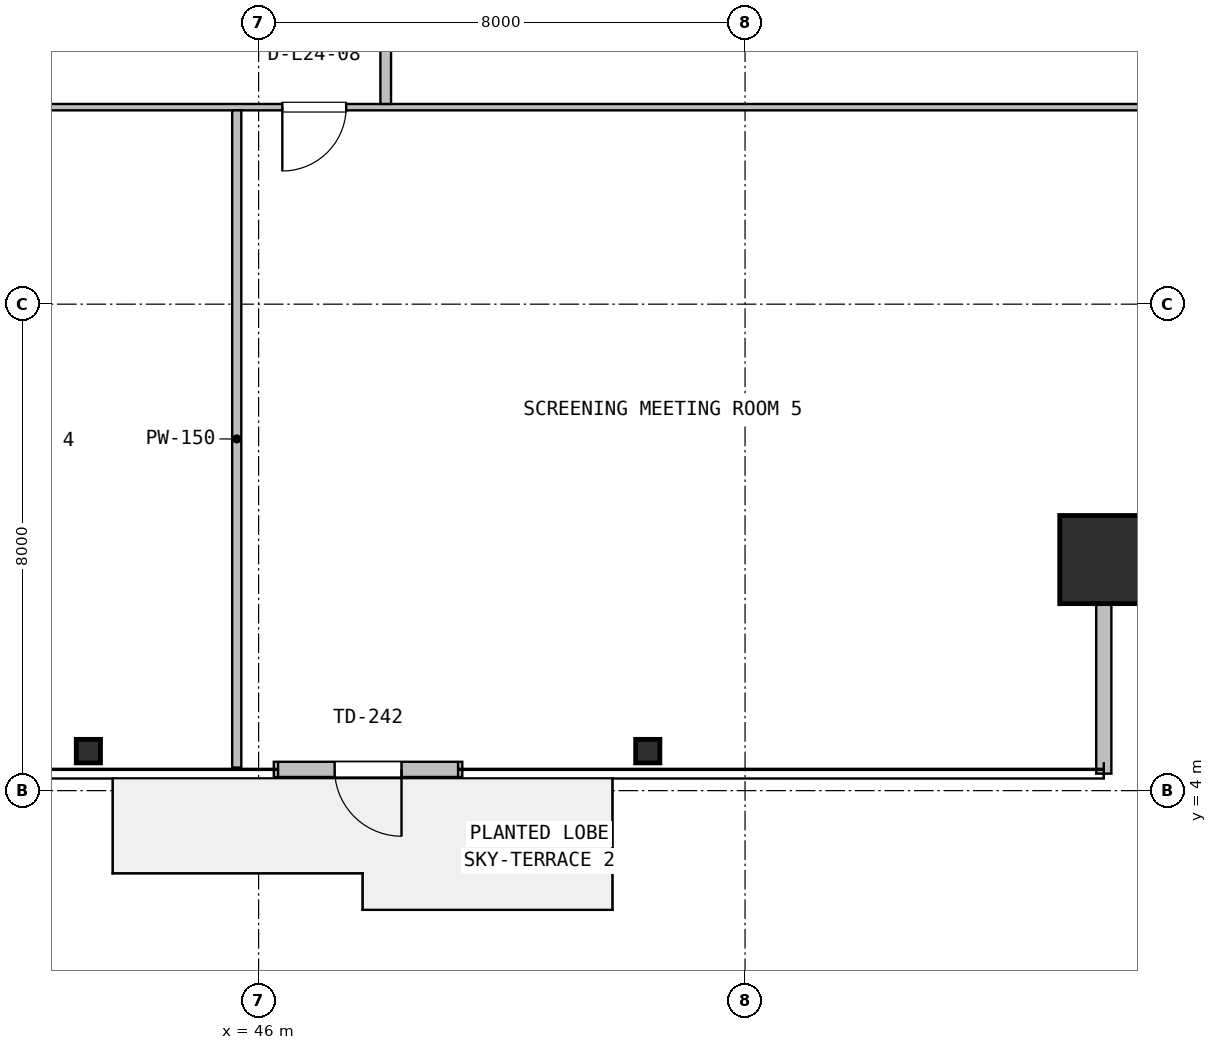
"""IFC4 building model, lengths in metres.
Left out: names, types, materials, properties, quantities, classifications, styles, units other than length and angle.
Written with IfcOpenShell. Run it as: python <this file> out.ifc"""

import sys

from ifc_helpers import new_model, si_unit, direction, frame, frame_2d, origin, origin_2d, place, context, subcontext, project, spatial, rectangle, hollow_rectangle, i_section, extrude, source, transform, mapped, element, fill, save


model = new_model("IFC4")
c1 = context("Model", 3, precision=1e-05, world=origin(), true_north=direction((0.0, 1.0)))
c2 = subcontext(c1, "Body", "Model", "MODEL_VIEW")
j1 = project(units=[si_unit("LENGTHUNIT", "METRE"), si_unit("PLANEANGLEUNIT", "RADIAN")], contexts=[c1])
p1 = place(None, origin())
s1 = spatial("IfcSite", under=j1, at=p1, CompositionType="ELEMENT")
p2 = place(p1, origin())
s2 = spatial("IfcBuilding", under=s1, at=p2, CompositionType="ELEMENT")
p3 = place(p2, frame((0.0, 0.0, 103.0)))
s3 = spatial("IfcBuildingStorey", under=s2, at=p3, CompositionType="ELEMENT", Elevation=103.0)
m1 = source(origin(), c2, "Body", "SweptSolid", [
    extrude(hollow_rectangle(XDim=1.45, YDim=1.45, WallThickness=0.055, at=origin_2d()), origin(), (0.0, 0.0, 1.0), 3.8),
])
p4 = place(p3, frame((59.9, 7.8, 0.0), z_axis=(0.0, 0.0, 1.0), x_axis=(1.0, 0.0, 0.0)))
e1 = element("IfcColumn", 1, at=p4, inside=s3, PredefinedType="COLUMN", context=c2, shape_type="MappedRepresentation", body=[
    mapped(m1, transform((0.0, 0.0, 0.0), x_axis=(1.0, 0.0, 0.0), y_axis=(0.0, 1.0, 0.0), z_axis=(0.0, 0.0, 1.0), scale=1.0)),
])
m2 = source(origin(), c2, "Body", "SweptSolid", [
    extrude(i_section(OverallWidth=0.398, OverallDepth=0.387, WebThickness=0.021, FlangeThickness=0.033, FilletRadius=0.018, at=origin_2d()), origin(), (0.0, 0.0, 1.0), 3.8),
])
for number, where, z_axis, x_axis in (
    (2, (43.2, 4.65, 0.0), (0.0, 0.0, 1.0), (1.0, 0.0, 0.0)),
    (3, (52.4, 4.65, 0.0), (0.0, 0.0, 1.0), (1.0, 0.0, 0.0)),
):
    element("IfcColumn", number, at=place(p3, frame(where, z_axis=z_axis, x_axis=x_axis)), inside=s3, PredefinedType="COLUMN", context=c2, shape_type="MappedRepresentation", body=[
        mapped(m2, transform((0.0, 0.0, 0.0), x_axis=(1.0, 0.0, 0.0), y_axis=(0.0, 1.0, 0.0), z_axis=(0.0, 0.0, 1.0), scale=1.0)),
    ])
p5 = place(p3, frame((46.25, 4.35, 0.0), z_axis=(0.0, 0.0, 1.0), x_axis=(1.0, 0.0, 0.0)))
e4 = element("IfcWall", 4, at=p5, inside=s3, PredefinedType="SOLIDWALL", context=c2, shape_type="SweptSolid", body=[
    extrude(rectangle(XDim=3.1, YDim=0.25, at=frame_2d((1.55, 0.0))), origin(), (0.0, 0.0, 1.0), 3.53),
])
p6 = place(p5, frame((1.0, 0.0, 0.0)))
e5 = element("IfcOpeningElement", 5, at=p6, cuts=e4, PredefinedType="OPENING", context=c2, shape_type="SweptSolid", body=[
    extrude(rectangle(XDim=1.1, YDim=2.15, at=frame_2d((0.55, 1.075))), frame((0.0, 0.135, 0.0), z_axis=(0.0, -1.0, 0.0), x_axis=(1.0, 0.0, 0.0)), (0.0, 0.0, 1.0), 0.27),
])
p7 = place(p3, frame((59.9, 4.28, 0.0), z_axis=(0.0, 0.0, 1.0), x_axis=(0.0, 1.0, 0.0)))
e6 = element("IfcWall", 6, at=p7, inside=s3, PredefinedType="SOLIDWALL", context=c2, shape_type="SweptSolid", body=[
    extrude(rectangle(XDim=3.6, YDim=0.25, at=frame_2d((1.8, 0.0))), origin(), (0.0, 0.0, 1.0), 3.108),
])
p8 = place(p3, frame((4.68, 15.24, 0.0), z_axis=(0.0, 0.0, 1.0), x_axis=(1.0, 0.0, 0.0)))
e7 = element("IfcWall", 7, at=p8, inside=s3, PredefinedType="PARTITIONING", context=c2, shape_type="SweptSolid", body=[
    extrude(rectangle(XDim=58.64, YDim=0.105, at=frame_2d((29.32, 0.0))), origin(), (0.0, 0.0, 1.0), 2.83),
])
p9 = place(p8, frame((17.105, 0.0, 0.0)))
e8 = element("IfcOpeningElement", 8, at=p9, cuts=e7, PredefinedType="OPENING", context=c2, shape_type="SweptSolid", body=[
    extrude(rectangle(XDim=0.88, YDim=2.06, at=frame_2d((0.44, 1.03))), frame((0.0, 0.062, 0.0), z_axis=(0.0, -1.0, 0.0), x_axis=(1.0, 0.0, 0.0)), (0.0, 0.0, 1.0), 0.125),
])
p10 = place(p8, frame((21.005, 0.0, 0.0)))
e9 = element("IfcOpeningElement", 9, at=p10, cuts=e7, PredefinedType="OPENING", context=c2, shape_type="SweptSolid", body=[
    extrude(rectangle(XDim=0.88, YDim=2.06, at=frame_2d((0.44, 1.03))), frame((0.0, 0.062, 0.0), z_axis=(0.0, -1.0, 0.0), x_axis=(1.0, 0.0, 0.0)), (0.0, 0.0, 1.0), 0.125),
])
p11 = place(p8, frame((27.42, 0.0, 0.0)))
e10 = element("IfcOpeningElement", 10, at=p11, cuts=e7, PredefinedType="OPENING", context=c2, shape_type="SweptSolid", body=[
    extrude(rectangle(XDim=0.88, YDim=2.06, at=frame_2d((0.44, 1.03))), frame((0.0, 0.062, 0.0), z_axis=(0.0, -1.0, 0.0), x_axis=(1.0, 0.0, 0.0)), (0.0, 0.0, 1.0), 0.125),
])
p12 = place(p8, frame((35.845, 0.0, 0.0)))
e11 = element("IfcOpeningElement", 11, at=p12, cuts=e7, PredefinedType="OPENING", context=c2, shape_type="SweptSolid", body=[
    extrude(rectangle(XDim=0.92, YDim=2.08, at=frame_2d((0.46, 1.04))), frame((0.0, 0.062, 0.0), z_axis=(0.0, -1.0, 0.0), x_axis=(1.0, 0.0, 0.0)), (0.0, 0.0, 1.0), 0.125),
])
p13 = place(p8, frame((41.71, 0.0, 0.0)))
e12 = element("IfcOpeningElement", 12, at=p13, cuts=e7, PredefinedType="OPENING", context=c2, shape_type="SweptSolid", body=[
    extrude(rectangle(XDim=1.05, YDim=2.1, at=frame_2d((0.525, 1.05))), frame((0.0, 0.062, 0.0), z_axis=(0.0, -1.0, 0.0), x_axis=(1.0, 0.0, 0.0)), (0.0, 0.0, 1.0), 0.125),
])
p14 = place(p3, frame((45.64, 4.38, 0.0), z_axis=(0.0, 0.0, 1.0), x_axis=(0.0, 1.0, 0.0)))
e13 = element("IfcWall", 13, at=p14, inside=s3, PredefinedType="PARTITIONING", context=c2, shape_type="SweptSolid", body=[
    extrude(rectangle(XDim=10.808, YDim=0.15, at=frame_2d((5.404, 0.0))), origin(), (0.0, 0.0, 1.0), 3.108),
])
p15 = place(p3, frame((48.09, 15.293, 0.0), z_axis=(0.0, 0.0, 1.0), x_axis=(0.0, 1.0, 0.0)))
e14 = element("IfcWall", 14, at=p15, inside=s3, PredefinedType="PARTITIONING", context=c2, shape_type="SweptSolid", body=[
    extrude(rectangle(XDim=17.982, YDim=0.175, at=frame_2d((8.991, 0.0))), origin(), (0.0, 0.0, 1.0), 3.222),
])
p16 = place(p15, frame((1.572, 0.0, 0.0)))
e15 = element("IfcOpeningElement", 15, at=p16, cuts=e14, PredefinedType="OPENING", context=c2, shape_type="SweptSolid", body=[
    extrude(rectangle(XDim=1.05, YDim=2.1, at=frame_2d((0.525, 1.05))), frame((0.0, 0.098, 0.0), z_axis=(0.0, -1.0, 0.0), x_axis=(1.0, 0.0, 0.0)), (0.0, 0.0, 1.0), 0.195),
])
p17 = place(p15, frame((6.732, 0.0, 0.0)))
e16 = element("IfcOpeningElement", 16, at=p17, cuts=e14, PredefinedType="OPENING", context=c2, shape_type="SweptSolid", body=[
    extrude(rectangle(XDim=1.0, YDim=2.1, at=frame_2d((0.5, 1.05))), frame((0.0, 0.098, 0.0), z_axis=(0.0, -1.0, 0.0), x_axis=(1.0, 0.0, 0.0)), (0.0, 0.0, 1.0), 0.195),
])
m3 = source(origin(), c2, "Body", "SweptSolid", [
    extrude(rectangle(XDim=1.1, YDim=2.15, at=frame_2d((0.55, 1.075))), frame((0.0, 0.025, 0.0), z_axis=(0.0, -1.0, 0.0), x_axis=(1.0, 0.0, 0.0)), (0.0, 0.0, 1.0), 0.05),
])
p18 = place(p6, frame((1.1, 0.0, 0.0), z_axis=(0.0, 0.0, 1.0), x_axis=(-1.0, 0.0, 0.0)))
e17 = element("IfcDoor", 17, at=p18, inside=s3, OperationType="SINGLE_SWING_RIGHT", PredefinedType="DOOR", context=c2, shape_type="MappedRepresentation", body=[
    mapped(m3, transform((0.0, 0.0, 0.0), x_axis=(1.0, 0.0, 0.0), y_axis=(0.0, 1.0, 0.0), z_axis=(0.0, 0.0, 1.0), scale=1.0)),
])
fill(e5, e17)
m4 = source(origin(), c2, "Body", "SweptSolid", [
    extrude(rectangle(XDim=1.05, YDim=2.1, at=frame_2d((0.525, 1.05))), frame((0.0, 0.025, 0.0), z_axis=(0.0, -1.0, 0.0), x_axis=(1.0, 0.0, 0.0)), (0.0, 0.0, 1.0), 0.05),
])
p19 = place(p13, frame((1.05, 0.0, 0.0), z_axis=(0.0, 0.0, 1.0), x_axis=(-1.0, 0.0, 0.0)))
e18 = element("IfcDoor", 18, at=p19, inside=s3, OperationType="SINGLE_SWING_LEFT", PredefinedType="DOOR", context=c2, shape_type="MappedRepresentation", body=[
    mapped(m4, transform((0.0, 0.0, 0.0), x_axis=(1.0, 0.0, 0.0), y_axis=(0.0, 1.0, 0.0), z_axis=(0.0, 0.0, 1.0), scale=1.0)),
])
fill(e12, e18)
save(model, sys.argv[1])
